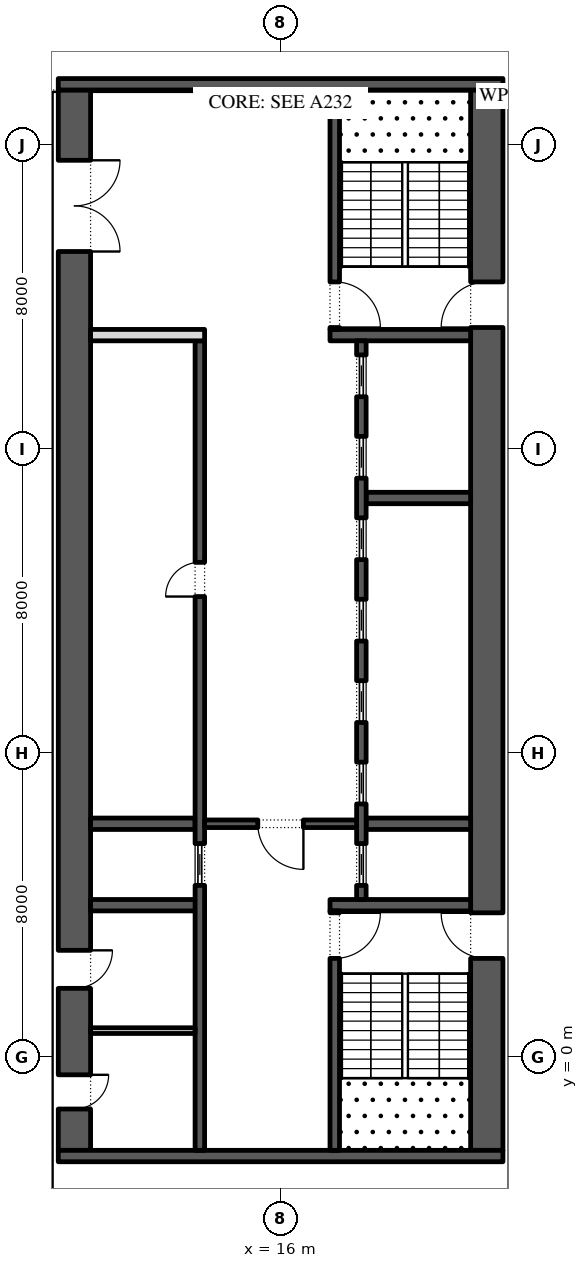
"""IFC4 building model, lengths in metres.
Left out: names, types, materials, properties, quantities, classifications, styles, units other than length and angle.
Written with IfcOpenShell. Run it as: python <this file> out.ifc"""

import sys

from ifc_helpers import new_model, si_unit, direction, frame, frame_2d, origin, place, context, subcontext, project, spatial, rectangle, extrude, element, fill, save


model = new_model("IFC4")
c1 = context("Model", 3, precision=1e-05, world=origin(), true_north=direction((0.0, 1.0)))
c2 = subcontext(c1, "Body", "Model", "MODEL_VIEW")
j1 = project(units=[si_unit("LENGTHUNIT", "METRE"), si_unit("PLANEANGLEUNIT", "RADIAN")], contexts=[c1])
p1 = place(None, origin())
s1 = spatial("IfcSite", under=j1, at=p1, CompositionType="ELEMENT")
p2 = place(p1, origin())
s2 = spatial("IfcBuilding", under=s1, at=p2, CompositionType="ELEMENT")
p3 = place(p2, frame((0.0, 0.0, 135.0)))
s3 = spatial("IfcBuildingStorey", under=s2, at=p3, CompositionType="ELEMENT", Elevation=135.0)
p4 = place(p3, frame((21.425, -2.45, 0.0), z_axis=(0.0, 0.0, 1.0), x_axis=(0.0, 1.0, 0.0)))
e1 = element("IfcWall", 1, at=p4, inside=s3, PredefinedType="SHEAR", context=c2, shape_type="SweptSolid", body=[
    extrude(rectangle(XDim=27.9, YDim=0.85, at=frame_2d((13.95, 0.0))), origin(), (0.0, 0.0, 1.0), 4.0),
])
p5 = place(p4, frame((5.05, 0.0, 0.0)))
e2 = element("IfcOpeningElement", 2, at=p5, cuts=e1, PredefinedType="OPENING", context=c2, shape_type="SweptSolid", body=[
    extrude(rectangle(XDim=1.2, YDim=2.1, at=frame_2d((0.6, 1.05))), frame((0.0, 0.435, 0.0), z_axis=(0.0, -1.0, 0.0), x_axis=(1.0, 0.0, 0.0)), (0.0, 0.0, 1.0), 0.87),
])
p6 = place(p4, frame((21.65, 0.0, 0.0)))
e3 = element("IfcOpeningElement", 3, at=p6, cuts=e1, PredefinedType="OPENING", context=c2, shape_type="SweptSolid", body=[
    extrude(rectangle(XDim=1.2, YDim=2.1, at=frame_2d((0.6, 1.05))), frame((0.0, 0.435, 0.0), z_axis=(0.0, -1.0, 0.0), x_axis=(1.0, 0.0, 0.0)), (0.0, 0.0, 1.0), 0.87),
])
p7 = place(p3, frame((10.575, -2.45, 0.0), z_axis=(0.0, 0.0, 1.0), x_axis=(0.0, 1.0, 0.0)))
e4 = element("IfcWall", 4, at=p7, inside=s3, PredefinedType="SHEAR", context=c2, shape_type="SweptSolid", body=[
    extrude(rectangle(XDim=27.9, YDim=0.85, at=frame_2d((13.95, 0.0))), origin(), (0.0, 0.0, 1.0), 4.0),
])
p8 = place(p7, frame((23.65, 0.0, 0.0)))
e5 = element("IfcOpeningElement", 5, at=p8, cuts=e4, PredefinedType="OPENING", context=c2, shape_type="SweptSolid", body=[
    extrude(rectangle(XDim=2.4, YDim=2.1, at=frame_2d((1.2, 1.05))), frame((0.0, 0.435, 0.0), z_axis=(0.0, -1.0, 0.0), x_axis=(1.0, 0.0, 0.0)), (0.0, 0.0, 1.0), 0.87),
])
p9 = place(p7, frame((1.087, 0.0, 0.0)))
e6 = element("IfcOpeningElement", 6, at=p9, cuts=e4, PredefinedType="OPENING", context=c2, shape_type="SweptSolid", body=[
    extrude(rectangle(XDim=0.9, YDim=2.1, at=frame_2d((0.45, 1.05))), frame((0.0, 0.435, 0.0), z_axis=(0.0, -1.0, 0.0), x_axis=(1.0, 0.0, 0.0)), (0.0, 0.0, 1.0), 0.87),
])
p10 = place(p7, frame((4.262, 0.0, 0.0)))
e7 = element("IfcOpeningElement", 7, at=p10, cuts=e4, PredefinedType="OPENING", context=c2, shape_type="SweptSolid", body=[
    extrude(rectangle(XDim=1.0, YDim=2.1, at=frame_2d((0.5, 1.05))), frame((0.0, 0.435, 0.0), z_axis=(0.0, -1.0, 0.0), x_axis=(1.0, 0.0, 0.0)), (0.0, 0.0, 1.0), 0.87),
])
for number, where, z_axis, x_axis in (
    (8, (10.15, -2.6, 0.0), (0.0, 0.0, 1.0), (1.0, 0.0, 0.0)),
    (9, (10.15, 25.6, 0.0), (0.0, 0.0, 1.0), (1.0, 0.0, 0.0)),
):
    element("IfcWall", number, at=place(p3, frame(where, z_axis=z_axis, x_axis=x_axis)), inside=s3, PredefinedType="SHEAR", context=c2, shape_type="SweptSolid", body=[
        extrude(rectangle(XDim=11.7, YDim=0.3, at=frame_2d((5.85, 0.0))), origin(), (0.0, 0.0, 1.0), 4.0),
    ])
p11 = place(p3, frame((17.3, 4.0, 0.0), z_axis=(0.0, 0.0, 1.0), x_axis=(1.0, 0.0, 0.0)))
e10 = element("IfcWall", 10, at=p11, inside=s3, PredefinedType="SHEAR", context=c2, shape_type="SweptSolid", body=[
    extrude(rectangle(XDim=3.7, YDim=0.3, at=frame_2d((1.85, 0.0))), origin(), (0.0, 0.0, 1.0), 4.0),
])
p12 = place(p3, frame((17.425, -2.45, 0.0), z_axis=(0.0, 0.0, 1.0), x_axis=(0.0, 1.0, 0.0)))
e11 = element("IfcWall", 11, at=p12, inside=s3, PredefinedType="SHEAR", context=c2, shape_type="SweptSolid", body=[
    extrude(rectangle(XDim=6.3, YDim=0.25, at=frame_2d((3.15, 0.0))), origin(), (0.0, 0.0, 1.0), 4.0),
])
p13 = place(p12, frame((5.05, 0.0, 0.0)))
e12 = element("IfcOpeningElement", 12, at=p13, cuts=e11, PredefinedType="OPENING", context=c2, shape_type="SweptSolid", body=[
    extrude(rectangle(XDim=1.2, YDim=2.1, at=frame_2d((0.6, 1.05))), frame((0.0, 0.135, 0.0), z_axis=(0.0, -1.0, 0.0), x_axis=(1.0, 0.0, 0.0)), (0.0, 0.0, 1.0), 0.27),
])
p14 = place(p3, frame((17.3, 19.0, 0.0), z_axis=(0.0, 0.0, 1.0), x_axis=(1.0, 0.0, 0.0)))
e13 = element("IfcWall", 13, at=p14, inside=s3, PredefinedType="SHEAR", context=c2, shape_type="SweptSolid", body=[
    extrude(rectangle(XDim=3.7, YDim=0.3, at=frame_2d((1.85, 0.0))), origin(), (0.0, 0.0, 1.0), 4.0),
])
p15 = place(p3, frame((17.425, 19.15, 0.0), z_axis=(0.0, 0.0, 1.0), x_axis=(0.0, 1.0, 0.0)))
e14 = element("IfcWall", 14, at=p15, inside=s3, PredefinedType="SHEAR", context=c2, shape_type="SweptSolid", body=[
    extrude(rectangle(XDim=6.3, YDim=0.25, at=frame_2d((3.15, 0.0))), origin(), (0.0, 0.0, 1.0), 4.0),
])
p16 = place(p15, frame((0.05, 0.0, 0.0)))
e15 = element("IfcOpeningElement", 15, at=p16, cuts=e14, PredefinedType="OPENING", context=c2, shape_type="SweptSolid", body=[
    extrude(rectangle(XDim=1.2, YDim=2.1, at=frame_2d((0.6, 1.05))), frame((0.0, 0.135, 0.0), z_axis=(0.0, -1.0, 0.0), x_axis=(1.0, 0.0, 0.0)), (0.0, 0.0, 1.0), 0.27),
])
for number, where, z_axis, x_axis in (
    (16, (18.25, 6.143, 0.0), (0.0, 0.0, 1.0), (1.0, 0.0, 0.0)),
    (17, (18.25, 14.714, 0.0), (0.0, 0.0, 1.0), (1.0, 0.0, 0.0)),
):
    element("IfcWall", number, at=place(p3, frame(where, z_axis=z_axis, x_axis=x_axis)), inside=s3, PredefinedType="SHEAR", context=c2, shape_type="SweptSolid", body=[
        extrude(rectangle(XDim=2.75, YDim=0.3, at=frame_2d((1.375, 0.0))), origin(), (0.0, 0.0, 1.0), 4.0),
    ])
p17 = place(p3, frame((18.125, 4.15, 0.0), z_axis=(0.0, 0.0, 1.0), x_axis=(0.0, 1.0, 0.0)))
e18 = element("IfcWall", 18, at=p17, inside=s3, PredefinedType="SHEAR", context=c2, shape_type="SweptSolid", body=[
    extrude(rectangle(XDim=14.7, YDim=0.25, at=frame_2d((7.35, 0.0))), origin(), (0.0, 0.0, 1.0), 4.0),
])
p18 = place(p17, frame((0.371, 0.0, 0.0)))
e19 = element("IfcOpeningElement", 19, at=p18, cuts=e18, PredefinedType="OPENING", context=c2, shape_type="SweptSolid", body=[
    extrude(rectangle(XDim=1.1, YDim=2.1, at=frame_2d((0.55, 1.05))), frame((0.0, 0.135, 0.0), z_axis=(0.0, -1.0, 0.0), x_axis=(1.0, 0.0, 0.0)), (0.0, 0.0, 1.0), 0.27),
])
p19 = place(p17, frame((2.514, 0.0, 0.0)))
e20 = element("IfcOpeningElement", 20, at=p19, cuts=e18, PredefinedType="OPENING", context=c2, shape_type="SweptSolid", body=[
    extrude(rectangle(XDim=1.1, YDim=2.1, at=frame_2d((0.55, 1.05))), frame((0.0, 0.135, 0.0), z_axis=(0.0, -1.0, 0.0), x_axis=(1.0, 0.0, 0.0)), (0.0, 0.0, 1.0), 0.27),
])
p20 = place(p17, frame((4.657, 0.0, 0.0)))
e21 = element("IfcOpeningElement", 21, at=p20, cuts=e18, PredefinedType="OPENING", context=c2, shape_type="SweptSolid", body=[
    extrude(rectangle(XDim=1.1, YDim=2.1, at=frame_2d((0.55, 1.05))), frame((0.0, 0.135, 0.0), z_axis=(0.0, -1.0, 0.0), x_axis=(1.0, 0.0, 0.0)), (0.0, 0.0, 1.0), 0.27),
])
p21 = place(p17, frame((6.8, 0.0, 0.0)))
e22 = element("IfcOpeningElement", 22, at=p21, cuts=e18, PredefinedType="OPENING", context=c2, shape_type="SweptSolid", body=[
    extrude(rectangle(XDim=1.1, YDim=2.1, at=frame_2d((0.55, 1.05))), frame((0.0, 0.135, 0.0), z_axis=(0.0, -1.0, 0.0), x_axis=(1.0, 0.0, 0.0)), (0.0, 0.0, 1.0), 0.27),
])
p22 = place(p17, frame((8.943, 0.0, 0.0)))
e23 = element("IfcOpeningElement", 23, at=p22, cuts=e18, PredefinedType="OPENING", context=c2, shape_type="SweptSolid", body=[
    extrude(rectangle(XDim=1.1, YDim=2.1, at=frame_2d((0.55, 1.05))), frame((0.0, 0.135, 0.0), z_axis=(0.0, -1.0, 0.0), x_axis=(1.0, 0.0, 0.0)), (0.0, 0.0, 1.0), 0.27),
])
p23 = place(p17, frame((11.086, 0.0, 0.0)))
e24 = element("IfcOpeningElement", 24, at=p23, cuts=e18, PredefinedType="OPENING", context=c2, shape_type="SweptSolid", body=[
    extrude(rectangle(XDim=1.1, YDim=2.1, at=frame_2d((0.55, 1.05))), frame((0.0, 0.135, 0.0), z_axis=(0.0, -1.0, 0.0), x_axis=(1.0, 0.0, 0.0)), (0.0, 0.0, 1.0), 0.27),
])
p24 = place(p17, frame((13.229, 0.0, 0.0)))
e25 = element("IfcOpeningElement", 25, at=p24, cuts=e18, PredefinedType="OPENING", context=c2, shape_type="SweptSolid", body=[
    extrude(rectangle(XDim=1.1, YDim=2.1, at=frame_2d((0.55, 1.05))), frame((0.0, 0.135, 0.0), z_axis=(0.0, -1.0, 0.0), x_axis=(1.0, 0.0, 0.0)), (0.0, 0.0, 1.0), 0.27),
])
p25 = place(p3, frame((11.0, 4.0, 0.0), z_axis=(0.0, 0.0, 1.0), x_axis=(1.0, 0.0, 0.0)))
e26 = element("IfcWall", 26, at=p25, inside=s3, PredefinedType="SHEAR", context=c2, shape_type="SweptSolid", body=[
    extrude(rectangle(XDim=3.0, YDim=0.3, at=frame_2d((1.5, 0.0))), origin(), (0.0, 0.0, 1.0), 4.0),
])
p26 = place(p3, frame((11.0, 6.143, 0.0), z_axis=(0.0, 0.0, 1.0), x_axis=(1.0, 0.0, 0.0)))
e27 = element("IfcWall", 27, at=p26, inside=s3, PredefinedType="SHEAR", context=c2, shape_type="SweptSolid", body=[
    extrude(rectangle(XDim=2.75, YDim=0.3, at=frame_2d((1.375, 0.0))), origin(), (0.0, 0.0, 1.0), 4.0),
])
p27 = place(p3, frame((13.875, -2.45, 0.0), z_axis=(0.0, 0.0, 1.0), x_axis=(0.0, 1.0, 0.0)))
e28 = element("IfcWall", 28, at=p27, inside=s3, PredefinedType="SHEAR", context=c2, shape_type="SweptSolid", body=[
    extrude(rectangle(XDim=21.3, YDim=0.25, at=frame_2d((10.65, 0.0))), origin(), (0.0, 0.0, 1.0), 4.0),
])
p28 = place(p27, frame((14.571, 0.0, 0.0)))
e29 = element("IfcOpeningElement", 29, at=p28, cuts=e28, PredefinedType="OPENING", context=c2, shape_type="SweptSolid", body=[
    extrude(rectangle(XDim=0.9, YDim=2.1, at=frame_2d((0.45, 1.05))), frame((0.0, 0.135, 0.0), z_axis=(0.0, -1.0, 0.0), x_axis=(1.0, 0.0, 0.0)), (0.0, 0.0, 1.0), 0.27),
])
p29 = place(p27, frame((6.971, 0.0, 0.0)))
e30 = element("IfcOpeningElement", 30, at=p29, cuts=e28, PredefinedType="OPENING", context=c2, shape_type="SweptSolid", body=[
    extrude(rectangle(XDim=1.1, YDim=2.1, at=frame_2d((0.55, 1.05))), frame((0.0, 0.135, 0.0), z_axis=(0.0, -1.0, 0.0), x_axis=(1.0, 0.0, 0.0)), (0.0, 0.0, 1.0), 0.27),
])
p30 = place(p3, frame((11.0, 19.0, 0.0), z_axis=(0.0, 0.0, 1.0), x_axis=(1.0, 0.0, 0.0)))
e31 = element("IfcWall", 31, at=p30, inside=s3, PredefinedType="PARTITIONING", context=c2, shape_type="SweptSolid", body=[
    extrude(rectangle(XDim=3.0, YDim=0.3, at=frame_2d((1.5, 0.0))), origin(), (0.0, 0.0, 1.0), 4.0),
])
p31 = place(p3, frame((14.0, 6.143, 0.0), z_axis=(0.0, 0.0, 1.0), x_axis=(1.0, 0.0, 0.0)))
e32 = element("IfcWall", 32, at=p31, inside=s3, PredefinedType="SHEAR", context=c2, shape_type="SweptSolid", body=[
    extrude(rectangle(XDim=4.0, YDim=0.2, at=frame_2d((2.0, 0.0))), origin(), (0.0, 0.0, 1.0), 4.0),
])
p32 = place(p31, frame((1.4, 0.0, 0.0)))
e33 = element("IfcOpeningElement", 33, at=p32, cuts=e32, PredefinedType="OPENING", context=c2, shape_type="SweptSolid", body=[
    extrude(rectangle(XDim=1.2, YDim=2.1, at=frame_2d((0.6, 1.05))), frame((0.0, 0.11, 0.0), z_axis=(0.0, -1.0, 0.0), x_axis=(1.0, 0.0, 0.0)), (0.0, 0.0, 1.0), 0.22),
])
p33 = place(p3, frame((11.0, 0.7, 0.0), z_axis=(0.0, 0.0, 1.0), x_axis=(1.0, 0.0, 0.0)))
e34 = element("IfcWall", 34, at=p33, inside=s3, PredefinedType="PARTITIONING", context=c2, shape_type="SweptSolid", body=[
    extrude(rectangle(XDim=2.75, YDim=0.15, at=frame_2d((1.375, 0.0))), origin(), (0.0, 0.0, 1.0), 4.0),
])
p34 = place(p18, origin())
e35 = element("IfcDoor", 35, at=p34, inside=s3, OperationType="SLIDING_TO_LEFT", PredefinedType="DOOR", context=c2, shape_type="SweptSolid", body=[
    extrude(rectangle(XDim=1.1, YDim=2.1, at=frame_2d((0.55, 1.05))), frame((0.0, 0.025, 0.0), z_axis=(0.0, -1.0, 0.0), x_axis=(1.0, 0.0, 0.0)), (0.0, 0.0, 1.0), 0.05),
])
fill(e19, e35)
p35 = place(p19, origin())
e36 = element("IfcDoor", 36, at=p35, inside=s3, OperationType="SLIDING_TO_LEFT", PredefinedType="DOOR", context=c2, shape_type="SweptSolid", body=[
    extrude(rectangle(XDim=1.1, YDim=2.1, at=frame_2d((0.55, 1.05))), frame((0.0, 0.025, 0.0), z_axis=(0.0, -1.0, 0.0), x_axis=(1.0, 0.0, 0.0)), (0.0, 0.0, 1.0), 0.05),
])
fill(e20, e36)
p36 = place(p20, origin())
e37 = element("IfcDoor", 37, at=p36, inside=s3, OperationType="SLIDING_TO_LEFT", PredefinedType="DOOR", context=c2, shape_type="SweptSolid", body=[
    extrude(rectangle(XDim=1.1, YDim=2.1, at=frame_2d((0.55, 1.05))), frame((0.0, 0.025, 0.0), z_axis=(0.0, -1.0, 0.0), x_axis=(1.0, 0.0, 0.0)), (0.0, 0.0, 1.0), 0.05),
])
fill(e21, e37)
p37 = place(p21, origin())
e38 = element("IfcDoor", 38, at=p37, inside=s3, OperationType="SLIDING_TO_LEFT", PredefinedType="DOOR", context=c2, shape_type="SweptSolid", body=[
    extrude(rectangle(XDim=1.1, YDim=2.1, at=frame_2d((0.55, 1.05))), frame((0.0, 0.025, 0.0), z_axis=(0.0, -1.0, 0.0), x_axis=(1.0, 0.0, 0.0)), (0.0, 0.0, 1.0), 0.05),
])
fill(e22, e38)
p38 = place(p22, origin())
e39 = element("IfcDoor", 39, at=p38, inside=s3, OperationType="SLIDING_TO_LEFT", PredefinedType="DOOR", context=c2, shape_type="SweptSolid", body=[
    extrude(rectangle(XDim=1.1, YDim=2.1, at=frame_2d((0.55, 1.05))), frame((0.0, 0.025, 0.0), z_axis=(0.0, -1.0, 0.0), x_axis=(1.0, 0.0, 0.0)), (0.0, 0.0, 1.0), 0.05),
])
fill(e23, e39)
p39 = place(p23, origin())
e40 = element("IfcDoor", 40, at=p39, inside=s3, OperationType="SLIDING_TO_LEFT", PredefinedType="DOOR", context=c2, shape_type="SweptSolid", body=[
    extrude(rectangle(XDim=1.1, YDim=2.1, at=frame_2d((0.55, 1.05))), frame((0.0, 0.025, 0.0), z_axis=(0.0, -1.0, 0.0), x_axis=(1.0, 0.0, 0.0)), (0.0, 0.0, 1.0), 0.05),
])
fill(e24, e40)
p40 = place(p24, origin())
e41 = element("IfcDoor", 41, at=p40, inside=s3, OperationType="SLIDING_TO_LEFT", PredefinedType="DOOR", context=c2, shape_type="SweptSolid", body=[
    extrude(rectangle(XDim=1.1, YDim=2.1, at=frame_2d((0.55, 1.05))), frame((0.0, 0.025, 0.0), z_axis=(0.0, -1.0, 0.0), x_axis=(1.0, 0.0, 0.0)), (0.0, 0.0, 1.0), 0.05),
])
fill(e25, e41)
p41 = place(p28, origin())
e42 = element("IfcDoor", 42, at=p41, inside=s3, OperationType="SINGLE_SWING_RIGHT", PredefinedType="DOOR", context=c2, shape_type="SweptSolid", body=[
    extrude(rectangle(XDim=0.9, YDim=2.1, at=frame_2d((0.45, 1.05))), frame((0.0, 0.125, 0.0), z_axis=(0.0, -1.0, 0.0), x_axis=(1.0, 0.0, 0.0)), (0.0, 0.0, 1.0), 0.05),
])
fill(e29, e42)
p42 = place(p29, origin())
e43 = element("IfcDoor", 43, at=p42, inside=s3, OperationType="SLIDING_TO_LEFT", PredefinedType="DOOR", context=c2, shape_type="SweptSolid", body=[
    extrude(rectangle(XDim=1.1, YDim=2.1, at=frame_2d((0.55, 1.05))), frame((0.0, 0.025, 0.0), z_axis=(0.0, -1.0, 0.0), x_axis=(1.0, 0.0, 0.0)), (0.0, 0.0, 1.0), 0.05),
])
fill(e30, e43)
p43 = place(p32, frame((1.2, 0.0, 0.0), z_axis=(0.0, 0.0, 1.0), x_axis=(-1.0, 0.0, 0.0)))
e44 = element("IfcDoor", 44, at=p43, inside=s3, OperationType="SINGLE_SWING_RIGHT", PredefinedType="DOOR", context=c2, shape_type="SweptSolid", body=[
    extrude(rectangle(XDim=1.2, YDim=2.1, at=frame_2d((0.6, 1.05))), frame((0.0, 0.025, 0.0), z_axis=(0.0, -1.0, 0.0), x_axis=(1.0, 0.0, 0.0)), (0.0, 0.0, 1.0), 0.05),
])
fill(e33, e44)
p44 = place(p8, frame((2.4, 0.0, 0.0), z_axis=(0.0, 0.0, 1.0), x_axis=(-1.0, 0.0, 0.0)))
e45 = element("IfcDoor", 45, at=p44, inside=s3, OperationType="DOUBLE_DOOR_SINGLE_SWING", PredefinedType="DOOR", context=c2, shape_type="SweptSolid", body=[
    extrude(rectangle(XDim=2.4, YDim=2.1, at=frame_2d((1.2, 1.05))), frame((0.0, 0.025, 0.0), z_axis=(0.0, -1.0, 0.0), x_axis=(1.0, 0.0, 0.0)), (0.0, 0.0, 1.0), 0.05),
])
fill(e5, e45)
p45 = place(p13, frame((1.2, 0.0, 0.0), z_axis=(0.0, 0.0, 1.0), x_axis=(-1.0, 0.0, 0.0)))
e46 = element("IfcDoor", 46, at=p45, inside=s3, OperationType="SINGLE_SWING_RIGHT", PredefinedType="DOOR", context=c2, shape_type="SweptSolid", body=[
    extrude(rectangle(XDim=1.2, YDim=2.1, at=frame_2d((0.6, 1.05))), frame((0.0, 0.025, 0.0), z_axis=(0.0, -1.0, 0.0), x_axis=(1.0, 0.0, 0.0)), (0.0, 0.0, 1.0), 0.05),
])
fill(e12, e46)
p46 = place(p5, origin())
e47 = element("IfcDoor", 47, at=p46, inside=s3, OperationType="SINGLE_SWING_LEFT", PredefinedType="DOOR", context=c2, shape_type="SweptSolid", body=[
    extrude(rectangle(XDim=1.2, YDim=2.1, at=frame_2d((0.6, 1.05))), frame((0.0, 0.025, 0.0), z_axis=(0.0, -1.0, 0.0), x_axis=(1.0, 0.0, 0.0)), (0.0, 0.0, 1.0), 0.05),
])
fill(e2, e47)
p47 = place(p16, frame((1.2, 0.0, 0.0), z_axis=(0.0, 0.0, 1.0), x_axis=(-1.0, 0.0, 0.0)))
e48 = element("IfcDoor", 48, at=p47, inside=s3, OperationType="SINGLE_SWING_LEFT", PredefinedType="DOOR", context=c2, shape_type="SweptSolid", body=[
    extrude(rectangle(XDim=1.2, YDim=2.1, at=frame_2d((0.6, 1.05))), frame((0.0, 0.025, 0.0), z_axis=(0.0, -1.0, 0.0), x_axis=(1.0, 0.0, 0.0)), (0.0, 0.0, 1.0), 0.05),
])
fill(e15, e48)
p48 = place(p6, origin())
e49 = element("IfcDoor", 49, at=p48, inside=s3, OperationType="SINGLE_SWING_RIGHT", PredefinedType="DOOR", context=c2, shape_type="SweptSolid", body=[
    extrude(rectangle(XDim=1.2, YDim=2.1, at=frame_2d((0.6, 1.05))), frame((0.0, 0.025, 0.0), z_axis=(0.0, -1.0, 0.0), x_axis=(1.0, 0.0, 0.0)), (0.0, 0.0, 1.0), 0.05),
])
fill(e3, e49)
p49 = place(p9, frame((0.9, -0.8, 0.0), z_axis=(0.0, 0.0, 1.0), x_axis=(-1.0, 0.0, 0.0)))
e50 = element("IfcDoor", 50, at=p49, inside=s3, OperationType="SINGLE_SWING_RIGHT", PredefinedType="DOOR", context=c2, shape_type="SweptSolid", body=[
    extrude(rectangle(XDim=0.9, YDim=2.1, at=frame_2d((0.45, 1.05))), frame((0.0, -0.375, 0.0), z_axis=(0.0, -1.0, 0.0), x_axis=(1.0, 0.0, 0.0)), (0.0, 0.0, 1.0), 0.05),
])
fill(e6, e50)
p50 = place(p10, frame((1.0, -0.8, 0.0), z_axis=(0.0, 0.0, 1.0), x_axis=(-1.0, 0.0, 0.0)))
e51 = element("IfcDoor", 51, at=p50, inside=s3, OperationType="SINGLE_SWING_RIGHT", PredefinedType="DOOR", context=c2, shape_type="SweptSolid", body=[
    extrude(rectangle(XDim=1.0, YDim=2.1, at=frame_2d((0.5, 1.05))), frame((0.0, -0.375, 0.0), z_axis=(0.0, -1.0, 0.0), x_axis=(1.0, 0.0, 0.0)), (0.0, 0.0, 1.0), 0.05),
])
fill(e7, e51)
save(model, sys.argv[1])
